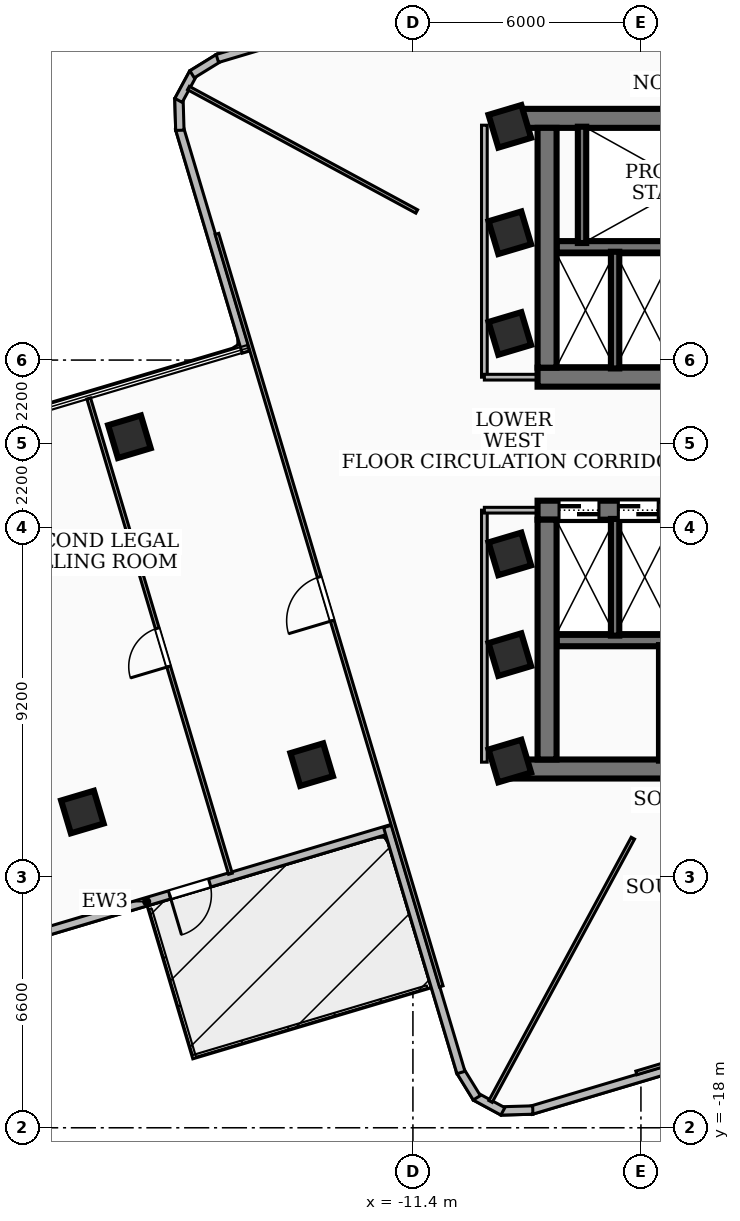
"""IFC4 building model, lengths in metres.
Left out: names, types, materials, properties, quantities, classifications, styles, units other than length and angle.
Written with IfcOpenShell. Run it as: python <this file> out.ifc"""

import sys

from ifc_helpers import new_model, si_unit, direction, frame, frame_2d, origin, origin_2d, place, context, subcontext, project, spatial, rectangle, extrude, element, fill, save


model = new_model("IFC4")
c1 = context("Model", 3, precision=1e-05, world=origin(), true_north=direction((0.0, 1.0)))
c2 = subcontext(c1, "Body", "Model", "MODEL_VIEW")
j1 = project(units=[si_unit("LENGTHUNIT", "METRE"), si_unit("PLANEANGLEUNIT", "RADIAN")], contexts=[c1])
p1 = place(None, origin())
s1 = spatial("IfcSite", under=j1, at=p1, CompositionType="ELEMENT")
p2 = place(p1, origin())
s2 = spatial("IfcBuilding", under=s1, at=p2, CompositionType="ELEMENT")
p3 = place(p2, frame((0.0, 0.0, 141.48)))
s3 = spatial("IfcBuildingStorey", under=s2, at=p3, CompositionType="ELEMENT", Elevation=141.48)
p4 = place(p3, frame((-8.78, 8.56, 0.0), z_axis=(0.0, 0.0, 1.0), x_axis=(1.0, 0.0, 0.0)))
e1 = element("IfcWall", 1, at=p4, inside=s3, PredefinedType="SHEAR", context=c2, shape_type="SweptSolid", body=[
    extrude(rectangle(XDim=17.56, YDim=0.5, at=frame_2d((8.78, 0.0))), origin(), (0.0, 0.0, 1.0), 3.32),
])
p5 = place(p3, frame((8.12, 1.75, 0.0), z_axis=(0.0, 0.0, 1.0), x_axis=(-1.0, 0.0, 0.0)))
e2 = element("IfcWall", 2, at=p5, inside=s3, PredefinedType="SHEAR", context=c2, shape_type="SweptSolid", body=[
    extrude(rectangle(XDim=16.24, YDim=0.5, at=frame_2d((8.12, 0.0))), origin(), (0.0, 0.0, 1.0), 3.32),
])
p6 = place(p5, frame((7.45, 0.0, 0.0)))
e3 = element("IfcOpeningElement", 3, at=p6, cuts=e2, PredefinedType="OPENING", context=c2, shape_type="SweptSolid", body=[
    extrude(rectangle(XDim=1.0, YDim=2.1, at=frame_2d((0.5, 1.05))), frame((0.0, 0.26, 0.0), z_axis=(0.0, -1.0, 0.0), x_axis=(1.0, 0.0, 0.0)), (0.0, 0.0, 1.0), 0.52),
])
p7 = place(p5, frame((3.85, 0.0, 0.0)))
e4 = element("IfcOpeningElement", 4, at=p7, cuts=e2, PredefinedType="OPENING", context=c2, shape_type="SweptSolid", body=[
    extrude(rectangle(XDim=0.9, YDim=2.06, at=frame_2d((0.45, 1.03))), frame((0.0, 0.26, 0.0), z_axis=(0.0, -1.0, 0.0), x_axis=(1.0, 0.0, 0.0)), (0.0, 0.0, 1.0), 0.52),
])
p8 = place(p5, frame((2.35, 0.0, 0.0)))
e5 = element("IfcOpeningElement", 5, at=p8, cuts=e2, PredefinedType="OPENING", context=c2, shape_type="SweptSolid", body=[
    extrude(rectangle(XDim=0.9, YDim=2.06, at=frame_2d((0.45, 1.03))), frame((0.0, 0.26, 0.0), z_axis=(0.0, -1.0, 0.0), x_axis=(1.0, 0.0, 0.0)), (0.0, 0.0, 1.0), 0.52),
])
p9 = place(p5, frame((0.8, 0.0, 0.0)))
e6 = element("IfcOpeningElement", 6, at=p9, cuts=e2, PredefinedType="OPENING", context=c2, shape_type="SweptSolid", body=[
    extrude(rectangle(XDim=0.9, YDim=2.06, at=frame_2d((0.45, 1.03))), frame((0.0, 0.26, 0.0), z_axis=(0.0, -1.0, 0.0), x_axis=(1.0, 0.0, 0.0)), (0.0, 0.0, 1.0), 0.52),
])
p10 = place(p3, frame((-7.87, 2.0, 0.0), z_axis=(0.0, 0.0, 1.0), x_axis=(0.0, 1.0, 0.0)))
e7 = element("IfcWall", 7, at=p10, inside=s3, PredefinedType="SHEAR", context=c2, shape_type="SweptSolid", body=[
    extrude(rectangle(XDim=6.31, YDim=0.5, at=frame_2d((3.155, 0.0))), origin(), (0.0, 0.0, 1.0), 3.32),
])
p11 = place(p3, frame((7.62, 5.18, 0.0), z_axis=(0.0, 0.0, 1.0), x_axis=(-1.0, 0.0, 0.0)))
e8 = element("IfcWall", 8, at=p11, inside=s3, PredefinedType="SOLIDWALL", context=c2, shape_type="SweptSolid", body=[
    extrude(rectangle(XDim=15.24, YDim=0.3, at=frame_2d((7.62, 0.0))), origin(), (0.0, 0.0, 1.0), 3.32),
])
p12 = place(p11, frame((5.77, 0.0, 0.0)))
e9 = element("IfcOpeningElement", 9, at=p12, cuts=e8, PredefinedType="OPENING", context=c2, shape_type="SweptSolid", body=[
    extrude(rectangle(XDim=1.1, YDim=2.15, at=frame_2d((0.55, 1.075))), frame((0.0, 0.16, 0.0), z_axis=(0.0, -1.0, 0.0), x_axis=(1.0, 0.0, 0.0)), (0.0, 0.0, 1.0), 0.32),
])
p13 = place(p11, frame((2.97, 0.0, 0.0)))
e10 = element("IfcOpeningElement", 10, at=p13, cuts=e8, PredefinedType="OPENING", context=c2, shape_type="SweptSolid", body=[
    extrude(rectangle(XDim=1.1, YDim=2.15, at=frame_2d((0.55, 1.075))), frame((0.0, 0.16, 0.0), z_axis=(0.0, -1.0, 0.0), x_axis=(1.0, 0.0, 0.0)), (0.0, 0.0, 1.0), 0.32),
])
p14 = place(p11, frame((7.97, 0.0, 0.0)))
e11 = element("IfcOpeningElement", 11, at=p14, cuts=e8, PredefinedType="OPENING", context=c2, shape_type="SweptSolid", body=[
    extrude(rectangle(XDim=1.0, YDim=2.1, at=frame_2d((0.5, 1.05))), frame((0.0, 0.16, 0.0), z_axis=(0.0, -1.0, 0.0), x_axis=(1.0, 0.0, 0.0)), (0.0, 0.0, 1.0), 0.32),
])
p15 = place(p3, frame((8.78, -8.56, 0.0), z_axis=(0.0, 0.0, 1.0), x_axis=(-1.0, 0.0, 0.0)))
e12 = element("IfcWall", 12, at=p15, inside=s3, PredefinedType="SHEAR", context=c2, shape_type="SweptSolid", body=[
    extrude(rectangle(XDim=17.56, YDim=0.5, at=frame_2d((8.78, 0.0))), origin(), (0.0, 0.0, 1.0), 3.32),
])
p16 = place(p3, frame((-8.12, -1.75, 0.0), z_axis=(0.0, 0.0, 1.0), x_axis=(1.0, 0.0, 0.0)))
e13 = element("IfcWall", 13, at=p16, inside=s3, PredefinedType="SHEAR", context=c2, shape_type="SweptSolid", body=[
    extrude(rectangle(XDim=16.24, YDim=0.5, at=frame_2d((8.12, 0.0))), origin(), (0.0, 0.0, 1.0), 3.32),
])
p17 = place(p16, frame((7.45, 0.0, 0.0)))
e14 = element("IfcOpeningElement", 14, at=p17, cuts=e13, PredefinedType="OPENING", context=c2, shape_type="SweptSolid", body=[
    extrude(rectangle(XDim=1.0, YDim=2.1, at=frame_2d((0.5, 1.05))), frame((0.0, 0.26, 0.0), z_axis=(0.0, -1.0, 0.0), x_axis=(1.0, 0.0, 0.0)), (0.0, 0.0, 1.0), 0.52),
])
p18 = place(p16, frame((12.65, 0.0, 0.0)))
e15 = element("IfcOpeningElement", 15, at=p18, cuts=e13, PredefinedType="OPENING", context=c2, shape_type="SweptSolid", body=[
    extrude(rectangle(XDim=0.9, YDim=2.06, at=frame_2d((0.45, 1.03))), frame((0.0, 0.26, 0.0), z_axis=(0.0, -1.0, 0.0), x_axis=(1.0, 0.0, 0.0)), (0.0, 0.0, 1.0), 0.52),
])
p19 = place(p16, frame((0.565, 0.0, 0.0)))
e16 = element("IfcOpeningElement", 16, at=p19, cuts=e13, PredefinedType="OPENING", context=c2, shape_type="SweptSolid", body=[
    extrude(rectangle(XDim=1.05, YDim=2.15, at=frame_2d((0.525, 1.075))), frame((0.0, 0.26, 0.0), z_axis=(0.0, -1.0, 0.0), x_axis=(1.0, 0.0, 0.0)), (0.0, 0.0, 1.0), 0.52),
])
p20 = place(p16, frame((2.125, 0.0, 0.0)))
e17 = element("IfcOpeningElement", 17, at=p20, cuts=e13, PredefinedType="OPENING", context=c2, shape_type="SweptSolid", body=[
    extrude(rectangle(XDim=1.05, YDim=2.15, at=frame_2d((0.525, 1.075))), frame((0.0, 0.26, 0.0), z_axis=(0.0, -1.0, 0.0), x_axis=(1.0, 0.0, 0.0)), (0.0, 0.0, 1.0), 0.52),
])
p21 = place(p16, frame((3.685, 0.0, 0.0)))
e18 = element("IfcOpeningElement", 18, at=p21, cuts=e13, PredefinedType="OPENING", context=c2, shape_type="SweptSolid", body=[
    extrude(rectangle(XDim=1.05, YDim=2.15, at=frame_2d((0.525, 1.075))), frame((0.0, 0.26, 0.0), z_axis=(0.0, -1.0, 0.0), x_axis=(1.0, 0.0, 0.0)), (0.0, 0.0, 1.0), 0.52),
])
p22 = place(p3, frame((-7.87, -8.31, 0.0), z_axis=(0.0, 0.0, 1.0), x_axis=(0.0, 1.0, 0.0)))
e19 = element("IfcWall", 19, at=p22, inside=s3, PredefinedType="SHEAR", context=c2, shape_type="SweptSolid", body=[
    extrude(rectangle(XDim=6.31, YDim=0.5, at=frame_2d((3.155, 0.0))), origin(), (0.0, 0.0, 1.0), 3.32),
])
p23 = place(p3, frame((-7.62, -5.18, 0.0), z_axis=(0.0, 0.0, 1.0), x_axis=(1.0, 0.0, 0.0)))
e20 = element("IfcWall", 20, at=p23, inside=s3, PredefinedType="SOLIDWALL", context=c2, shape_type="SweptSolid", body=[
    extrude(rectangle(XDim=15.24, YDim=0.3, at=frame_2d((7.62, 0.0))), origin(), (0.0, 0.0, 1.0), 3.32),
])
p24 = place(p23, frame((5.77, 0.0, 0.0)))
e21 = element("IfcOpeningElement", 21, at=p24, cuts=e20, PredefinedType="OPENING", context=c2, shape_type="SweptSolid", body=[
    extrude(rectangle(XDim=1.1, YDim=2.15, at=frame_2d((0.55, 1.075))), frame((0.0, 0.16, 0.0), z_axis=(0.0, -1.0, 0.0), x_axis=(1.0, 0.0, 0.0)), (0.0, 0.0, 1.0), 0.32),
])
p25 = place(p23, frame((7.97, 0.0, 0.0)))
e22 = element("IfcOpeningElement", 22, at=p25, cuts=e20, PredefinedType="OPENING", context=c2, shape_type="SweptSolid", body=[
    extrude(rectangle(XDim=1.0, YDim=2.1, at=frame_2d((0.5, 1.05))), frame((0.0, 0.16, 0.0), z_axis=(0.0, -1.0, 0.0), x_axis=(1.0, 0.0, 0.0)), (0.0, 0.0, 1.0), 0.32),
])
p26 = place(p3, frame((-6.95, 5.28, 0.0), z_axis=(0.0, 0.0, 1.0), x_axis=(0.0, 1.0, 0.0)))
e23 = element("IfcWall", 23, at=p26, inside=s3, PredefinedType="SOLIDWALL", context=c2, shape_type="SweptSolid", body=[
    extrude(rectangle(XDim=3.06, YDim=0.22, at=frame_2d((1.53, 0.0))), origin(), (0.0, 0.0, 1.0), 3.32),
])
p27 = place(p3, frame((-4.8, -8.34, 0.0), z_axis=(0.0, 0.0, 1.0), x_axis=(0.0, 1.0, 0.0)))
e24 = element("IfcWall", 24, at=p27, inside=s3, PredefinedType="SOLIDWALL", context=c2, shape_type="SweptSolid", body=[
    extrude(rectangle(XDim=3.04, YDim=0.25, at=frame_2d((1.52, 0.0))), origin(), (0.0, 0.0, 1.0), 3.32),
])
for number, where, z_axis, x_axis in (
    (25, (-6.08, 1.98, 0.0), (0.0, 0.0, 1.0), (0.0, 1.0, 0.0)),
    (26, (-6.08, -5.05, 0.0), (0.0, 0.0, 1.0), (0.0, 1.0, 0.0)),
):
    element("IfcWall", number, at=place(p3, frame(where, z_axis=z_axis, x_axis=x_axis)), inside=s3, PredefinedType="SOLIDWALL", context=c2, shape_type="SweptSolid", body=[
        extrude(rectangle(XDim=3.07, YDim=0.22, at=frame_2d((1.535, 0.0))), origin(), (0.0, 0.0, 1.0), 3.32),
    ])
for number, where, z_axis, x_axis in (
    (27, (-8.85, -5.55, 0.0), (0.0, 0.0, 1.0), (0.958, 0.286, 0.0)),
    (28, (-8.85, -2.9, 0.0), (0.0, 0.0, 1.0), (0.958, 0.286, 0.0)),
    (29, (-8.85, 2.9, 0.0), (0.0, 0.0, 1.0), (0.958, 0.286, 0.0)),
    (30, (-8.85, 5.55, 0.0), (0.0, 0.0, 1.0), (0.958, 0.286, 0.0)),
    (31, (-8.85, 8.35, 0.0), (0.0, 0.0, 1.0), (0.958, 0.286, 0.0)),
    (32, (-8.85, -8.35, 0.0), (0.0, 0.0, 1.0), (0.958, 0.286, 0.0)),
    (33, (-18.86, 0.183, 0.0), (0.0, 0.0, 1.0), (0.958, 0.286, 0.0)),
    (34, (-14.064, -8.445, 0.0), (0.0, 0.0, 1.0), (0.958, 0.286, 0.0)),
    (35, (-20.098, -9.692, 0.0), (0.0, 0.0, 1.0), (0.958, 0.286, 0.0)),
):
    element("IfcColumn", number, at=place(p3, frame(where, z_axis=z_axis, x_axis=x_axis)), inside=s3, PredefinedType="COLUMN", context=c2, shape_type="SweptSolid", body=[
        extrude(rectangle(XDim=0.9, YDim=0.9, at=origin_2d()), origin(), (0.0, 0.0, 1.0), 3.6),
    ])
p28 = place(p3, frame((-11.957, -10.129, 0.0), z_axis=(0.0, 0.0, 1.0), x_axis=(-0.958343962332, -0.285616613419, 0.0)))
e36 = element("IfcWall", 36, at=p28, inside=s3, PredefinedType="SOLIDWALL", context=c2, shape_type="SweptSolid", body=[
    extrude(rectangle(XDim=13.458, YDim=0.22, at=frame_2d((6.729, 0.0))), origin(), (0.0, 0.0, 1.0), 2.7),
])
p29 = place(p28, frame((5.0, 0.0, 0.0)))
e37 = element("IfcOpeningElement", 37, at=p29, cuts=e36, PredefinedType="OPENING", context=c2, shape_type="SweptSolid", body=[
    extrude(rectangle(XDim=1.1, YDim=2.1, at=frame_2d((0.55, 1.05))), frame((0.0, 0.12, 0.0), z_axis=(0.0, -1.0, 0.0), x_axis=(1.0, 0.0, 0.0)), (0.0, 0.0, 1.0), 0.24),
])
p30 = place(p3, frame((-15.787, 2.412, 0.0), z_axis=(0.0, 0.0, 1.0), x_axis=(-0.285712854037, 0.958315274342, 0.0)))
e38 = element("IfcWall", 38, at=p30, inside=s3, PredefinedType="SOLIDWALL", context=c2, shape_type="SweptSolid", body=[
    extrude(rectangle(XDim=6.139, YDim=0.22, at=frame_2d((3.069, 0.0))), origin(), (0.0, 0.0, 1.0), 3.32),
])
p31 = place(p3, frame((-17.533, 8.246, 0.0), z_axis=(0.0, 0.0, 1.0), x_axis=(-0.028676726094, 0.999588738122, 0.0)))
e39 = element("IfcWall", 39, at=p31, inside=s3, PredefinedType="SOLIDWALL", context=c2, shape_type="SweptSolid", body=[
    extrude(rectangle(XDim=0.834, YDim=0.22, at=frame_2d((0.417, 0.0))), origin(), (0.0, 0.0, 1.0), 3.32),
])
p32 = place(p3, frame((-17.568, 9.033, 0.0), z_axis=(0.0, 0.0, 1.0), x_axis=(0.475928115507, 0.879484183411, 0.0)))
e40 = element("IfcWall", 40, at=p32, inside=s3, PredefinedType="SOLIDWALL", context=c2, shape_type="SweptSolid", body=[
    extrude(rectangle(XDim=0.82, YDim=0.22, at=frame_2d((0.41, 0.0))), origin(), (0.0, 0.0, 1.0), 3.32),
])
p33 = place(p3, frame((-17.211, 9.719, 0.0), z_axis=(0.0, 0.0, 1.0), x_axis=(0.851597982144, 0.524195456684, 0.0)))
e41 = element("IfcWall", 41, at=p33, inside=s3, PredefinedType="SOLIDWALL", context=c2, shape_type="SweptSolid", body=[
    extrude(rectangle(XDim=0.834, YDim=0.22, at=frame_2d((0.417, 0.0))), origin(), (0.0, 0.0, 1.0), 3.32),
])
p34 = place(p3, frame((-16.546, 10.136, 0.0), z_axis=(0.0, 0.0, 1.0), x_axis=(0.958346765514, 0.285607207592, 0.0)))
e42 = element("IfcWall", 42, at=p34, inside=s3, PredefinedType="SOLIDWALL", context=c2, shape_type="SweptSolid", body=[
    extrude(rectangle(XDim=6.757, YDim=0.22, at=frame_2d((3.379, 0.0))), origin(), (0.0, 0.0, 1.0), 3.32),
])
p35 = place(p3, frame((-2.412, -15.787, 0.0), z_axis=(0.0, 0.0, 1.0), x_axis=(-0.958315274342, -0.285712854037, 0.0)))
e43 = element("IfcWall", 43, at=p35, inside=s3, PredefinedType="SOLIDWALL", context=c2, shape_type="SweptSolid", body=[
    extrude(rectangle(XDim=6.139, YDim=0.22, at=frame_2d((3.069, 0.0))), origin(), (0.0, 0.0, 1.0), 2.55),
])
p36 = place(p3, frame((-8.246, -17.533, 0.0), z_axis=(0.0, 0.0, 1.0), x_axis=(-0.999588738122, -0.028676726094, 0.0)))
e44 = element("IfcWall", 44, at=p36, inside=s3, PredefinedType="SOLIDWALL", context=c2, shape_type="SweptSolid", body=[
    extrude(rectangle(XDim=0.834, YDim=0.22, at=frame_2d((0.417, 0.0))), origin(), (0.0, 0.0, 1.0), 3.32),
])
p37 = place(p3, frame((-9.033, -17.568, 0.0), z_axis=(0.0, 0.0, 1.0), x_axis=(-0.879484183411, 0.475928115507, 0.0)))
e45 = element("IfcWall", 45, at=p37, inside=s3, PredefinedType="SOLIDWALL", context=c2, shape_type="SweptSolid", body=[
    extrude(rectangle(XDim=0.82, YDim=0.22, at=frame_2d((0.41, 0.0))), origin(), (0.0, 0.0, 1.0), 3.32),
])
p38 = place(p3, frame((-9.719, -17.211, 0.0), z_axis=(0.0, 0.0, 1.0), x_axis=(-0.524195456684, 0.851597982144, 0.0)))
e46 = element("IfcWall", 46, at=p38, inside=s3, PredefinedType="SOLIDWALL", context=c2, shape_type="SweptSolid", body=[
    extrude(rectangle(XDim=0.834, YDim=0.22, at=frame_2d((0.417, 0.0))), origin(), (0.0, 0.0, 1.0), 3.32),
])
p39 = place(p3, frame((-10.136, -16.546, 0.0), z_axis=(0.0, 0.0, 1.0), x_axis=(-0.285607207592, 0.958346765514, 0.0)))
e47 = element("IfcWall", 47, at=p39, inside=s3, PredefinedType="SOLIDWALL", context=c2, shape_type="SweptSolid", body=[
    extrude(rectangle(XDim=6.757, YDim=0.22, at=frame_2d((3.379, 0.0))), origin(), (0.0, 0.0, 1.0), 2.7),
])
p40 = place(p3, frame((-9.52, 1.75, 0.0), z_axis=(0.0, 0.0, 1.0), x_axis=(0.0, 1.0, 0.0)))
e48 = element("IfcWall", 48, at=p40, inside=s3, PredefinedType="PARTITIONING", context=c2, shape_type="SweptSolid", body=[
    extrude(rectangle(XDim=6.63, YDim=0.15, at=frame_2d((3.315, 0.0))), origin(), (0.0, 0.0, 1.0), 2.55),
])
p41 = place(p3, frame((-7.85, 1.75, 0.0), z_axis=(0.0, 0.0, 1.0), x_axis=(-1.0, 0.0, 0.0)))
e49 = element("IfcWall", 49, at=p41, inside=s3, PredefinedType="PARTITIONING", context=c2, shape_type="SweptSolid", body=[
    extrude(rectangle(XDim=1.67, YDim=0.15, at=frame_2d((0.835, 0.0))), origin(), (0.0, 0.0, 1.0), 2.55),
])
p42 = place(p3, frame((-9.52, -8.38, 0.0), z_axis=(0.0, 0.0, 1.0), x_axis=(0.0, 1.0, 0.0)))
e50 = element("IfcWall", 50, at=p42, inside=s3, PredefinedType="PARTITIONING", context=c2, shape_type="SweptSolid", body=[
    extrude(rectangle(XDim=6.63, YDim=0.15, at=frame_2d((3.315, 0.0))), origin(), (0.0, 0.0, 1.0), 2.55),
])
p43 = place(p3, frame((-7.85, -1.75, 0.0), z_axis=(0.0, 0.0, 1.0), x_axis=(-1.0, 0.0, 0.0)))
e51 = element("IfcWall", 51, at=p43, inside=s3, PredefinedType="PARTITIONING", context=c2, shape_type="SweptSolid", body=[
    extrude(rectangle(XDim=1.67, YDim=0.15, at=frame_2d((0.835, 0.0))), origin(), (0.0, 0.0, 1.0), 2.55),
])
p44 = place(p3, frame((-11.3, 6.11, 0.0), z_axis=(0.0, 0.0, 1.0), x_axis=(-0.879653556483, 0.475614991948, 0.0)))
e52 = element("IfcWall", 52, at=p44, inside=s3, PredefinedType="PARTITIONING", context=c2, shape_type="SweptSolid", body=[
    extrude(rectangle(XDim=6.829, YDim=0.1, at=frame_2d((3.414, 0.0))), origin(), (0.0, 0.0, 1.0), 3.32),
])
p45 = place(p3, frame((-5.612, -10.38, 0.0), z_axis=(0.0, 0.0, 1.0), x_axis=(-0.475666815962, -0.879625534073, 0.0)))
e53 = element("IfcWall", 53, at=p45, inside=s3, PredefinedType="PARTITIONING", context=c2, shape_type="SweptSolid", body=[
    extrude(rectangle(XDim=7.875, YDim=0.1, at=frame_2d((3.938, 0.0))), origin(), (0.0, 0.0, 1.0), 2.55),
])
p46 = place(p3, frame((-10.655, -14.279, 0.0), z_axis=(0.0, 0.0, 1.0), x_axis=(-0.285665949025, 0.958329257389, 0.0)))
e54 = element("IfcWall", 54, at=p46, inside=s3, PredefinedType="PARTITIONING", context=c2, shape_type="SweptSolid", body=[
    extrude(rectangle(XDim=20.66, YDim=0.1, at=frame_2d((10.33, 0.0))), origin(), (0.0, 0.0, 1.0), 2.55),
])
p47 = place(p46, frame((10.04, 0.0, 0.0)))
e55 = element("IfcOpeningElement", 55, at=p47, cuts=e54, PredefinedType="OPENING", context=c2, shape_type="SweptSolid", body=[
    extrude(rectangle(XDim=1.2, YDim=2.1, at=frame_2d((0.6, 1.05))), frame((0.0, 0.06, 0.0), z_axis=(0.0, -1.0, 0.0), x_axis=(1.0, 0.0, 0.0)), (0.0, 0.0, 1.0), 0.12),
])
p48 = place(p3, frame((-16.203, -11.316, 0.0), z_axis=(0.0, 0.0, 1.0), x_axis=(-0.285679130118, 0.958325328171, 0.0)))
e56 = element("IfcWall", 56, at=p48, inside=s3, PredefinedType="PARTITIONING", context=c2, shape_type="SweptSolid", body=[
    extrude(rectangle(XDim=13.05, YDim=0.1, at=frame_2d((6.525, 0.0))), origin(), (0.0, 0.0, 1.0), 2.55),
])
p49 = place(p48, frame((5.689, 0.0, 0.0)))
e57 = element("IfcOpeningElement", 57, at=p49, cuts=e56, PredefinedType="OPENING", context=c2, shape_type="SweptSolid", body=[
    extrude(rectangle(XDim=1.05, YDim=2.08, at=frame_2d((0.525, 1.04))), frame((0.0, 0.06, 0.0), z_axis=(0.0, -1.0, 0.0), x_axis=(1.0, 0.0, 0.0)), (0.0, 0.0, 1.0), 0.12),
])
p50 = place(p3, frame((14.279, -10.655, 0.0), z_axis=(0.0, 0.0, 1.0), x_axis=(-0.958329257389, -0.285665949025, 0.0)))
e58 = element("IfcWall", 58, at=p50, inside=s3, PredefinedType="PARTITIONING", context=c2, shape_type="SweptSolid", body=[
    extrude(rectangle(XDim=20.66, YDim=0.1, at=frame_2d((10.33, 0.0))), origin(), (0.0, 0.0, 1.0), 2.55),
])
p51 = place(p50, frame((10.04, 0.0, 0.0)))
e59 = element("IfcOpeningElement", 59, at=p51, cuts=e58, PredefinedType="OPENING", context=c2, shape_type="SweptSolid", body=[
    extrude(rectangle(XDim=1.2, YDim=2.1, at=frame_2d((0.6, 1.05))), frame((0.0, 0.06, 0.0), z_axis=(0.0, -1.0, 0.0), x_axis=(1.0, 0.0, 0.0)), (0.0, 0.0, 1.0), 0.12),
])
p52 = place(p29, origin())
e60 = element("IfcDoor", 60, at=p52, inside=s3, OperationType="SINGLE_SWING_RIGHT", PredefinedType="DOOR", context=c2, shape_type="SweptSolid", body=[
    extrude(rectangle(XDim=1.1, YDim=2.1, at=frame_2d((0.55, 1.05))), frame((0.0, 0.025, 0.0), z_axis=(0.0, -1.0, 0.0), x_axis=(1.0, 0.0, 0.0)), (0.0, 0.0, 1.0), 0.05),
])
fill(e37, e60)
p53 = place(p19, origin())
e61 = element("IfcDoor", 61, at=p53, inside=s3, OperationType="DOUBLE_DOOR_SLIDING", PredefinedType="DOOR", context=c2, shape_type="SweptSolid", body=[
    extrude(rectangle(XDim=1.05, YDim=2.15, at=frame_2d((0.525, 1.075))), frame((0.0, 0.025, 0.0), z_axis=(0.0, -1.0, 0.0), x_axis=(1.0, 0.0, 0.0)), (0.0, 0.0, 1.0), 0.05),
])
fill(e16, e61)
p54 = place(p20, origin())
e62 = element("IfcDoor", 62, at=p54, inside=s3, OperationType="DOUBLE_DOOR_SLIDING", PredefinedType="DOOR", context=c2, shape_type="SweptSolid", body=[
    extrude(rectangle(XDim=1.05, YDim=2.15, at=frame_2d((0.525, 1.075))), frame((0.0, 0.025, 0.0), z_axis=(0.0, -1.0, 0.0), x_axis=(1.0, 0.0, 0.0)), (0.0, 0.0, 1.0), 0.05),
])
fill(e17, e62)
p55 = place(p47, origin())
e63 = element("IfcDoor", 63, at=p55, inside=s3, OperationType="SINGLE_SWING_LEFT", PredefinedType="DOOR", context=c2, shape_type="SweptSolid", body=[
    extrude(rectangle(XDim=1.2, YDim=2.1, at=frame_2d((0.6, 1.05))), frame((0.0, 0.025, 0.0), z_axis=(0.0, -1.0, 0.0), x_axis=(1.0, 0.0, 0.0)), (0.0, 0.0, 1.0), 0.05),
])
fill(e55, e63)
p56 = place(p49, origin())
e64 = element("IfcDoor", 64, at=p56, inside=s3, OperationType="SINGLE_SWING_LEFT", PredefinedType="DOOR", context=c2, shape_type="SweptSolid", body=[
    extrude(rectangle(XDim=1.05, YDim=2.08, at=frame_2d((0.525, 1.04))), frame((0.0, 0.025, 0.0), z_axis=(0.0, -1.0, 0.0), x_axis=(1.0, 0.0, 0.0)), (0.0, 0.0, 1.0), 0.05),
])
fill(e57, e64)
save(model, sys.argv[1])
